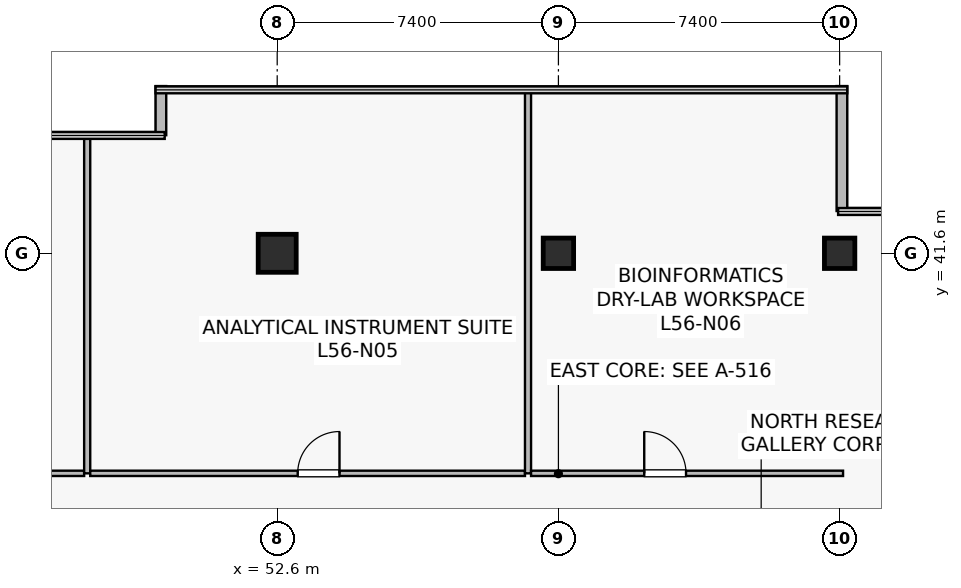
"""IFC4 building model, lengths in metres.
Left out: names, types, materials, properties, quantities, classifications, styles, units other than length and angle.
Written with IfcOpenShell. Run it as: python <this file> out.ifc"""

import sys

from ifc_helpers import new_model, si_unit, direction, frame, frame_2d, origin, origin_2d, place, context, subcontext, project, spatial, rectangle, extrude, source, transform, mapped, element, fill, save


model = new_model("IFC4")
c1 = context("Model", 3, precision=1e-05, world=origin(), true_north=direction((0.0, 1.0)))
c2 = subcontext(c1, "Body", "Model", "MODEL_VIEW")
j1 = project(units=[si_unit("LENGTHUNIT", "METRE"), si_unit("PLANEANGLEUNIT", "RADIAN")], contexts=[c1])
p1 = place(None, origin())
s1 = spatial("IfcSite", under=j1, at=p1, CompositionType="ELEMENT")
p2 = place(p1, origin())
s2 = spatial("IfcBuilding", under=s1, at=p2, CompositionType="ELEMENT")
p3 = place(p2, frame((0.0, 0.0, 234.2)))
s3 = spatial("IfcBuildingStorey", under=s2, at=p3, CompositionType="ELEMENT", Elevation=234.2)
m1 = source(origin(), c2, "Body", "SweptSolid", [
    extrude(rectangle(XDim=1.0, YDim=1.0, at=origin_2d()), origin(), (0.0, 0.0, 1.0), 4.1),
])
p4 = place(p3, frame((52.6, 41.6, 0.0), z_axis=(0.0, 0.0, 1.0), x_axis=(1.0, 0.0, 0.0)))
e1 = element("IfcColumn", 1, at=p4, inside=s3, PredefinedType="COLUMN", context=c2, shape_type="MappedRepresentation", body=[
    mapped(m1, transform((0.0, 0.0, 0.0), scale=1.0)),
])
m2 = source(origin(), c2, "Body", "SweptSolid", [
    extrude(rectangle(XDim=0.8, YDim=0.8, at=origin_2d()), origin(), (0.0, 0.0, 1.0), 4.1),
])
for number, where, z_axis, x_axis in (
    (2, (60.0, 41.6, 0.0), (0.0, 0.0, 1.0), (1.0, 0.0, 0.0)),
    (3, (67.4, 41.6, 0.0), (0.0, 0.0, 1.0), (1.0, 0.0, 0.0)),
):
    element("IfcColumn", number, at=place(p3, frame(where, z_axis=z_axis, x_axis=x_axis)), inside=s3, PredefinedType="COLUMN", context=c2, shape_type="MappedRepresentation", body=[
        mapped(m2, transform((0.0, 0.0, 0.0), scale=1.0)),
    ])
p5 = place(p3, frame((67.46, 42.712, 0.0), z_axis=(0.0, 0.0, 1.0), x_axis=(0.0, 1.0, 0.0)))
e4 = element("IfcWall", 4, at=p5, inside=s3, PredefinedType="STANDARD", context=c2, shape_type="SweptSolid", body=[
    extrude(rectangle(XDim=3.288, YDim=0.28, at=frame_2d((1.644, 0.0))), origin(), (0.0, 0.0, 1.0), 3.8),
])
p6 = place(p3, frame((49.54, 46.0, 0.0), z_axis=(0.0, 0.0, 1.0), x_axis=(0.0, -1.0, 0.0)))
e5 = element("IfcWall", 5, at=p6, inside=s3, PredefinedType="STANDARD", context=c2, shape_type="SweptSolid", body=[
    extrude(rectangle(XDim=1.293, YDim=0.28, at=frame_2d((0.646, 0.0))), origin(), (0.0, 0.0, 1.0), 3.8),
])
p7 = place(p3, frame((35.88, 35.81, 0.0), z_axis=(0.0, 0.0, 1.0), x_axis=(1.0, 0.0, 0.0)))
e6 = element("IfcWall", 6, at=p7, inside=s3, PredefinedType="PARTITIONING", context=c2, shape_type="SweptSolid", body=[
    extrude(rectangle(XDim=11.64, YDim=0.14, at=frame_2d((5.82, 0.0))), origin(), (0.0, 0.0, 1.0), 3.197),
])
p8 = place(p7, frame((4.385, 0.0, 0.0)))
e7 = element("IfcOpeningElement", 7, at=p8, cuts=e6, PredefinedType="OPENING", context=c2, shape_type="SweptSolid", body=[
    extrude(rectangle(XDim=1.1, YDim=2.18, at=frame_2d((0.55, 1.09))), frame((0.0, 0.08, 0.0), z_axis=(0.0, -1.0, 0.0), x_axis=(1.0, 0.0, 0.0)), (0.0, 0.0, 1.0), 0.16),
])
p9 = place(p3, frame((47.6, 35.81, 0.0), z_axis=(0.0, 0.0, 1.0), x_axis=(0.0, 1.0, 0.0)))
e8 = element("IfcWall", 8, at=p9, inside=s3, PredefinedType="PARTITIONING", context=c2, shape_type="SweptSolid", body=[
    extrude(rectangle(XDim=8.88, YDim=0.16, at=frame_2d((4.44, 0.0))), origin(), (0.0, 0.0, 1.0), 3.135),
])
p10 = place(p3, frame((47.68, 35.81, 0.0), z_axis=(0.0, 0.0, 1.0), x_axis=(1.0, 0.0, 0.0)))
e9 = element("IfcWall", 9, at=p10, inside=s3, PredefinedType="PARTITIONING", context=c2, shape_type="SweptSolid", body=[
    extrude(rectangle(XDim=11.44, YDim=0.14, at=frame_2d((5.72, 0.0))), origin(), (0.0, 0.0, 1.0), 3.197),
])
p11 = place(p10, frame((5.459, 0.0, 0.0)))
e10 = element("IfcOpeningElement", 10, at=p11, cuts=e9, PredefinedType="OPENING", context=c2, shape_type="SweptSolid", body=[
    extrude(rectangle(XDim=1.1, YDim=2.18, at=frame_2d((0.55, 1.09))), frame((0.0, 0.08, 0.0), z_axis=(0.0, -1.0, 0.0), x_axis=(1.0, 0.0, 0.0)), (0.0, 0.0, 1.0), 0.16),
])
p12 = place(p3, frame((59.2, 35.81, 0.0), z_axis=(0.0, 0.0, 1.0), x_axis=(0.0, 1.0, 0.0)))
e11 = element("IfcWall", 11, at=p12, inside=s3, PredefinedType="PARTITIONING", context=c2, shape_type="SweptSolid", body=[
    extrude(rectangle(XDim=10.08, YDim=0.16, at=frame_2d((5.04, 0.0))), origin(), (0.0, 0.0, 1.0), 3.135),
])
p13 = place(p3, frame((59.28, 35.81, 0.0), z_axis=(0.0, 0.0, 1.0), x_axis=(1.0, 0.0, 0.0)))
e12 = element("IfcWall", 12, at=p13, inside=s3, PredefinedType="PARTITIONING", context=c2, shape_type="SweptSolid", body=[
    extrude(rectangle(XDim=8.21, YDim=0.14, at=frame_2d((4.105, 0.0))), origin(), (0.0, 0.0, 1.0), 3.197),
])
p14 = place(p13, frame((2.978, 0.0, 0.0)))
e13 = element("IfcOpeningElement", 13, at=p14, cuts=e12, PredefinedType="OPENING", context=c2, shape_type="SweptSolid", body=[
    extrude(rectangle(XDim=1.1, YDim=2.18, at=frame_2d((0.55, 1.09))), frame((0.0, 0.08, 0.0), z_axis=(0.0, -1.0, 0.0), x_axis=(1.0, 0.0, 0.0)), (0.0, 0.0, 1.0), 0.16),
])
m3 = source(origin(), c2, "Body", "SweptSolid", [
    extrude(rectangle(XDim=1.1, YDim=2.18, at=frame_2d((0.55, 1.09))), frame((0.0, 0.025, 0.0), z_axis=(0.0, -1.0, 0.0), x_axis=(1.0, 0.0, 0.0)), (0.0, 0.0, 1.0), 0.05),
])
p15 = place(p11, origin())
e14 = element("IfcDoor", 14, at=p15, inside=s3, OperationType="SINGLE_SWING_RIGHT", PredefinedType="DOOR", context=c2, shape_type="MappedRepresentation", body=[
    mapped(m3, transform((0.0, 0.0, 0.0), scale=1.0)),
])
fill(e10, e14)
p16 = place(p14, origin())
e15 = element("IfcDoor", 15, at=p16, inside=s3, OperationType="SINGLE_SWING_LEFT", PredefinedType="DOOR", context=c2, shape_type="MappedRepresentation", body=[
    mapped(m3, transform((0.0, 0.0, 0.0), scale=1.0)),
])
fill(e13, e15)
save(model, sys.argv[1])
